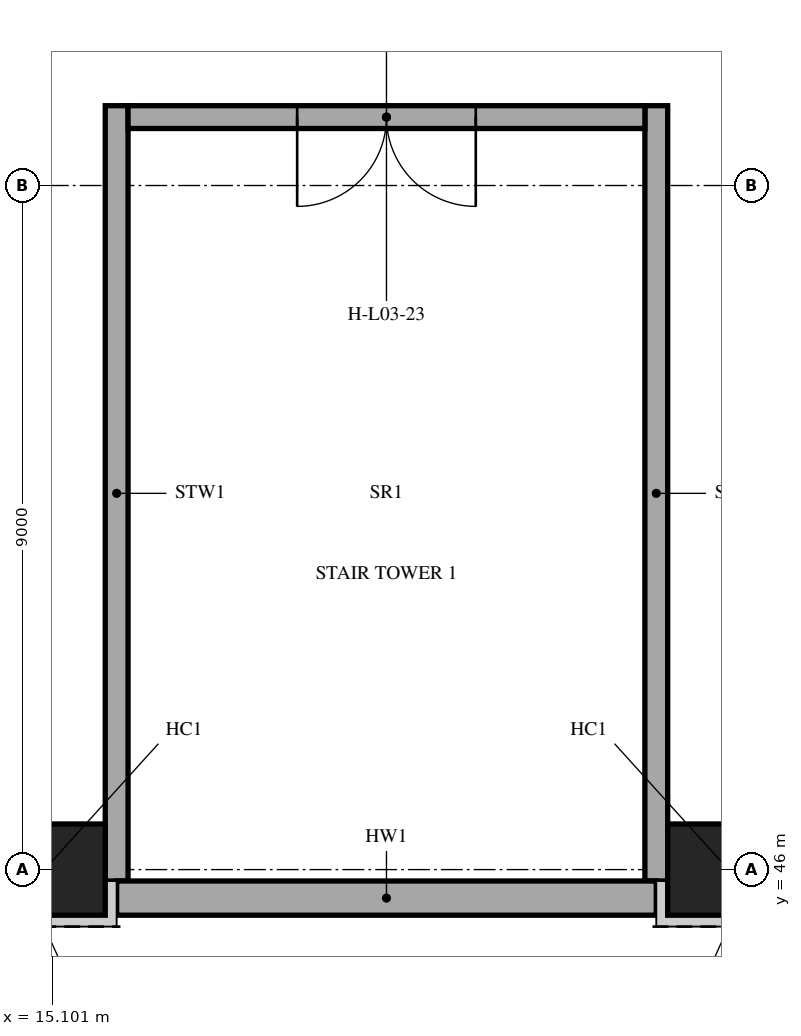
"""IFC4 building model, lengths in metres.
Left out: names, types, materials, properties, quantities, classifications, styles, units other than length and angle.
Written with IfcOpenShell. Run it as: python <this file> out.ifc"""

import sys

from ifc_helpers import new_model, si_unit, direction, frame, frame_2d, origin, origin_2d, place, context, subcontext, project, spatial, rectangle, extrude, element, fill, save


model = new_model("IFC4")
c1 = context("Model", 3, precision=1e-05, world=origin(), true_north=direction((0.0, 1.0)))
c2 = subcontext(c1, "Body", "Model", "MODEL_VIEW")
j1 = project(units=[si_unit("LENGTHUNIT", "METRE"), si_unit("PLANEANGLEUNIT", "RADIAN")], contexts=[c1])
p1 = place(None, origin())
s1 = spatial("IfcSite", under=j1, at=p1, CompositionType="ELEMENT")
p2 = place(p1, origin())
s2 = spatial("IfcBuilding", under=s1, at=p2, CompositionType="ELEMENT")
p3 = place(p2, frame((0.0, 0.0, 15.0)))
s3 = spatial("IfcBuildingStorey", under=s2, at=p3, CompositionType="ELEMENT", Elevation=15.0)
for number, where, z_axis, x_axis in (
    (1, (15.0, 46.0, 0.0), (0.0, 0.0, 1.0), (1.0, 0.0, 0.0)),
    (2, (24.0, 46.0, 0.0), (0.0, 0.0, 1.0), (1.0, 0.0, 0.0)),
):
    element("IfcColumn", number, at=place(p3, frame(where, z_axis=z_axis, x_axis=x_axis)), inside=s3, PredefinedType="COLUMN", context=c2, shape_type="SweptSolid", body=[
        extrude(rectangle(XDim=1.6, YDim=1.2, at=origin_2d()), origin(), (0.0, 0.0, 1.0), 4.2),
    ])
for number, where, z_axis, x_axis in (
    (3, (15.95, 45.85, 0.0), (0.0, 0.0, 1.0), (0.0, 1.0, 0.0)),
    (4, (23.05, 45.85, 0.0), (0.0, 0.0, 1.0), (0.0, 1.0, 0.0)),
):
    element("IfcWall", number, at=place(p3, frame(where, z_axis=z_axis, x_axis=x_axis)), inside=s3, PredefinedType="SHEAR", context=c2, shape_type="SweptSolid", body=[
        extrude(rectangle(XDim=10.2, YDim=0.3, at=frame_2d((5.1, 0.0))), origin(), (0.0, 0.0, 1.0), 3.9),
    ])
p4 = place(p3, frame((16.1, 55.9, 0.0), z_axis=(0.0, 0.0, 1.0), x_axis=(1.0, 0.0, 0.0)))
e5 = element("IfcWall", 5, at=p4, inside=s3, PredefinedType="SHEAR", context=c2, shape_type="SweptSolid", body=[
    extrude(rectangle(XDim=6.8, YDim=0.3, at=frame_2d((3.4, 0.0))), origin(), (0.0, 0.0, 1.0), 3.9),
])
p5 = place(p4, frame((2.225, 0.0, 0.0)))
e6 = element("IfcOpeningElement", 6, at=p5, cuts=e5, PredefinedType="OPENING", context=c2, shape_type="SweptSolid", body=[
    extrude(rectangle(XDim=2.35, YDim=2.1, at=frame_2d((1.175, 1.05))), frame((0.0, 0.16, 0.0), z_axis=(0.0, -1.0, 0.0), x_axis=(1.0, 0.0, 0.0)), (0.0, 0.0, 1.0), 0.32),
])
p6 = place(p3, frame((15.95, 45.625, 0.0), z_axis=(0.0, 0.0, 1.0), x_axis=(1.0, 0.0, 0.0)))
e7 = element("IfcWall", 7, at=p6, inside=s3, PredefinedType="SOLIDWALL", context=c2, shape_type="SweptSolid", body=[
    extrude(rectangle(XDim=7.1, YDim=0.45, at=frame_2d((3.55, 0.0))), origin(), (0.0, 0.0, 1.0), 4.2),
])
p7 = place(p5, frame((2.35, 0.0, 0.0), z_axis=(0.0, 0.0, 1.0), x_axis=(-1.0, 0.0, 0.0)))
e8 = element("IfcDoor", 8, at=p7, inside=s3, OperationType="DOUBLE_DOOR_SINGLE_SWING", PredefinedType="DOOR", context=c2, shape_type="SweptSolid", body=[
    extrude(rectangle(XDim=2.35, YDim=2.1, at=frame_2d((1.175, 1.05))), frame((0.0, 0.025, 0.0), z_axis=(0.0, -1.0, 0.0), x_axis=(1.0, 0.0, 0.0)), (0.0, 0.0, 1.0), 0.05),
])
fill(e6, e8)
save(model, sys.argv[1])
